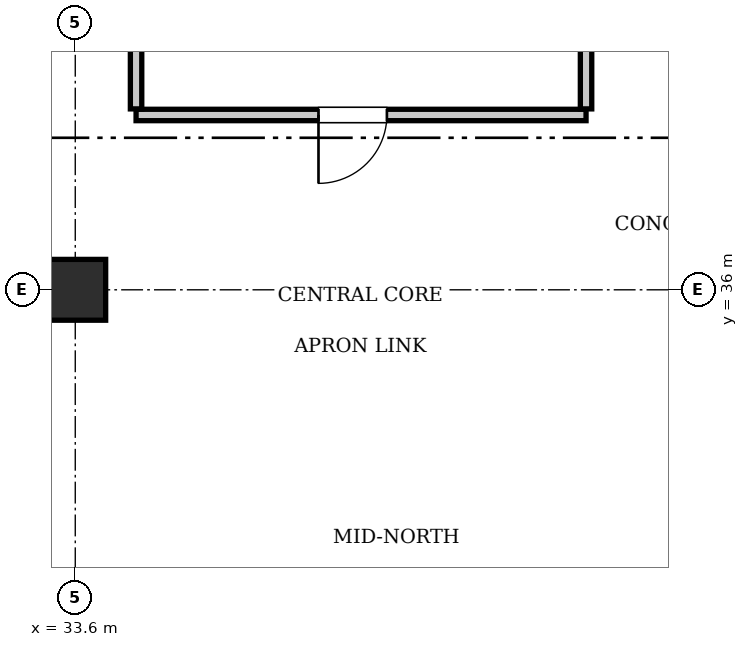
"""IFC4 building model, lengths in metres.
Left out: names, types, materials, properties, quantities, classifications, styles, units other than length and angle.
Written with IfcOpenShell. Run it as: python <this file> out.ifc"""

import sys

from ifc_helpers import new_model, si_unit, direction, frame, frame_2d, origin, origin_2d, place, context, subcontext, project, spatial, rectangle, extrude, element, fill, save


model = new_model("IFC4")
c1 = context("Model", 3, precision=1e-05, world=origin(), true_north=direction((0.0, 1.0)))
c2 = subcontext(c1, "Body", "Model", "MODEL_VIEW")
j1 = project(units=[si_unit("LENGTHUNIT", "METRE"), si_unit("PLANEANGLEUNIT", "RADIAN")], contexts=[c1])
p1 = place(None, origin())
s1 = spatial("IfcSite", under=j1, at=p1, CompositionType="ELEMENT")
p2 = place(p1, origin())
s2 = spatial("IfcBuilding", under=s1, at=p2, CompositionType="ELEMENT")
p3 = place(p2, frame((0.0, 0.0, 281.75)))
s3 = spatial("IfcBuildingStorey", under=s2, at=p3, CompositionType="ELEMENT", Elevation=281.75)
p4 = place(p3, frame((33.6, 36.0, 0.0), z_axis=(0.0, 0.0, 1.0), x_axis=(1.0, 0.0, 0.0)))
e1 = element("IfcColumn", 1, at=p4, inside=s3, PredefinedType="COLUMN", context=c2, shape_type="SweptSolid", body=[
    extrude(rectangle(XDim=0.8, YDim=0.8, at=origin_2d()), origin(), (0.0, 0.0, 1.0), 3.85),
])
p5 = place(p3, frame((34.4, 38.3, 0.0), z_axis=(0.0, 0.0, 1.0), x_axis=(1.0, 0.0, 0.0)))
e2 = element("IfcWall", 2, at=p5, inside=s3, PredefinedType="PARTITIONING", context=c2, shape_type="SweptSolid", body=[
    extrude(rectangle(XDim=5.92, YDim=0.15, at=frame_2d((2.96, 0.0))), origin(), (0.0, 0.0, 1.0), 3.61),
])
p6 = place(p5, frame((2.4, 0.0, 0.0)))
e3 = element("IfcOpeningElement", 3, at=p6, cuts=e2, PredefinedType="OPENING", context=c2, shape_type="SweptSolid", body=[
    extrude(rectangle(XDim=0.9, YDim=2.1, at=frame_2d((0.45, 1.05))), frame((0.0, 0.085, 0.0), z_axis=(0.0, -1.0, 0.0), x_axis=(1.0, 0.0, 0.0)), (0.0, 0.0, 1.0), 0.17),
])
for number, where, z_axis, x_axis in (
    (4, (34.4, 38.38, 0.0), (0.0, 0.0, 1.0), (0.0, 1.0, 0.0)),
    (5, (40.32, 38.38, 0.0), (0.0, 0.0, 1.0), (0.0, 1.0, 0.0)),
):
    element("IfcWall", number, at=place(p3, frame(where, z_axis=z_axis, x_axis=x_axis)), inside=s3, PredefinedType="PARTITIONING", context=c2, shape_type="SweptSolid", body=[
        extrude(rectangle(XDim=2.84, YDim=0.15, at=frame_2d((1.42, 0.0))), origin(), (0.0, 0.0, 1.0), 3.61),
    ])
p7 = place(p6, frame((0.9, 0.0, 0.0), z_axis=(0.0, 0.0, 1.0), x_axis=(-1.0, 0.0, 0.0)))
e6 = element("IfcDoor", 6, at=p7, inside=s3, OperationType="SINGLE_SWING_RIGHT", PredefinedType="DOOR", context=c2, shape_type="SweptSolid", body=[
    extrude(rectangle(XDim=0.9, YDim=2.1, at=frame_2d((0.45, 1.05))), frame((0.0, 0.025, 0.0), z_axis=(0.0, -1.0, 0.0), x_axis=(1.0, 0.0, 0.0)), (0.0, 0.0, 1.0), 0.05),
])
fill(e3, e6)
save(model, sys.argv[1])
